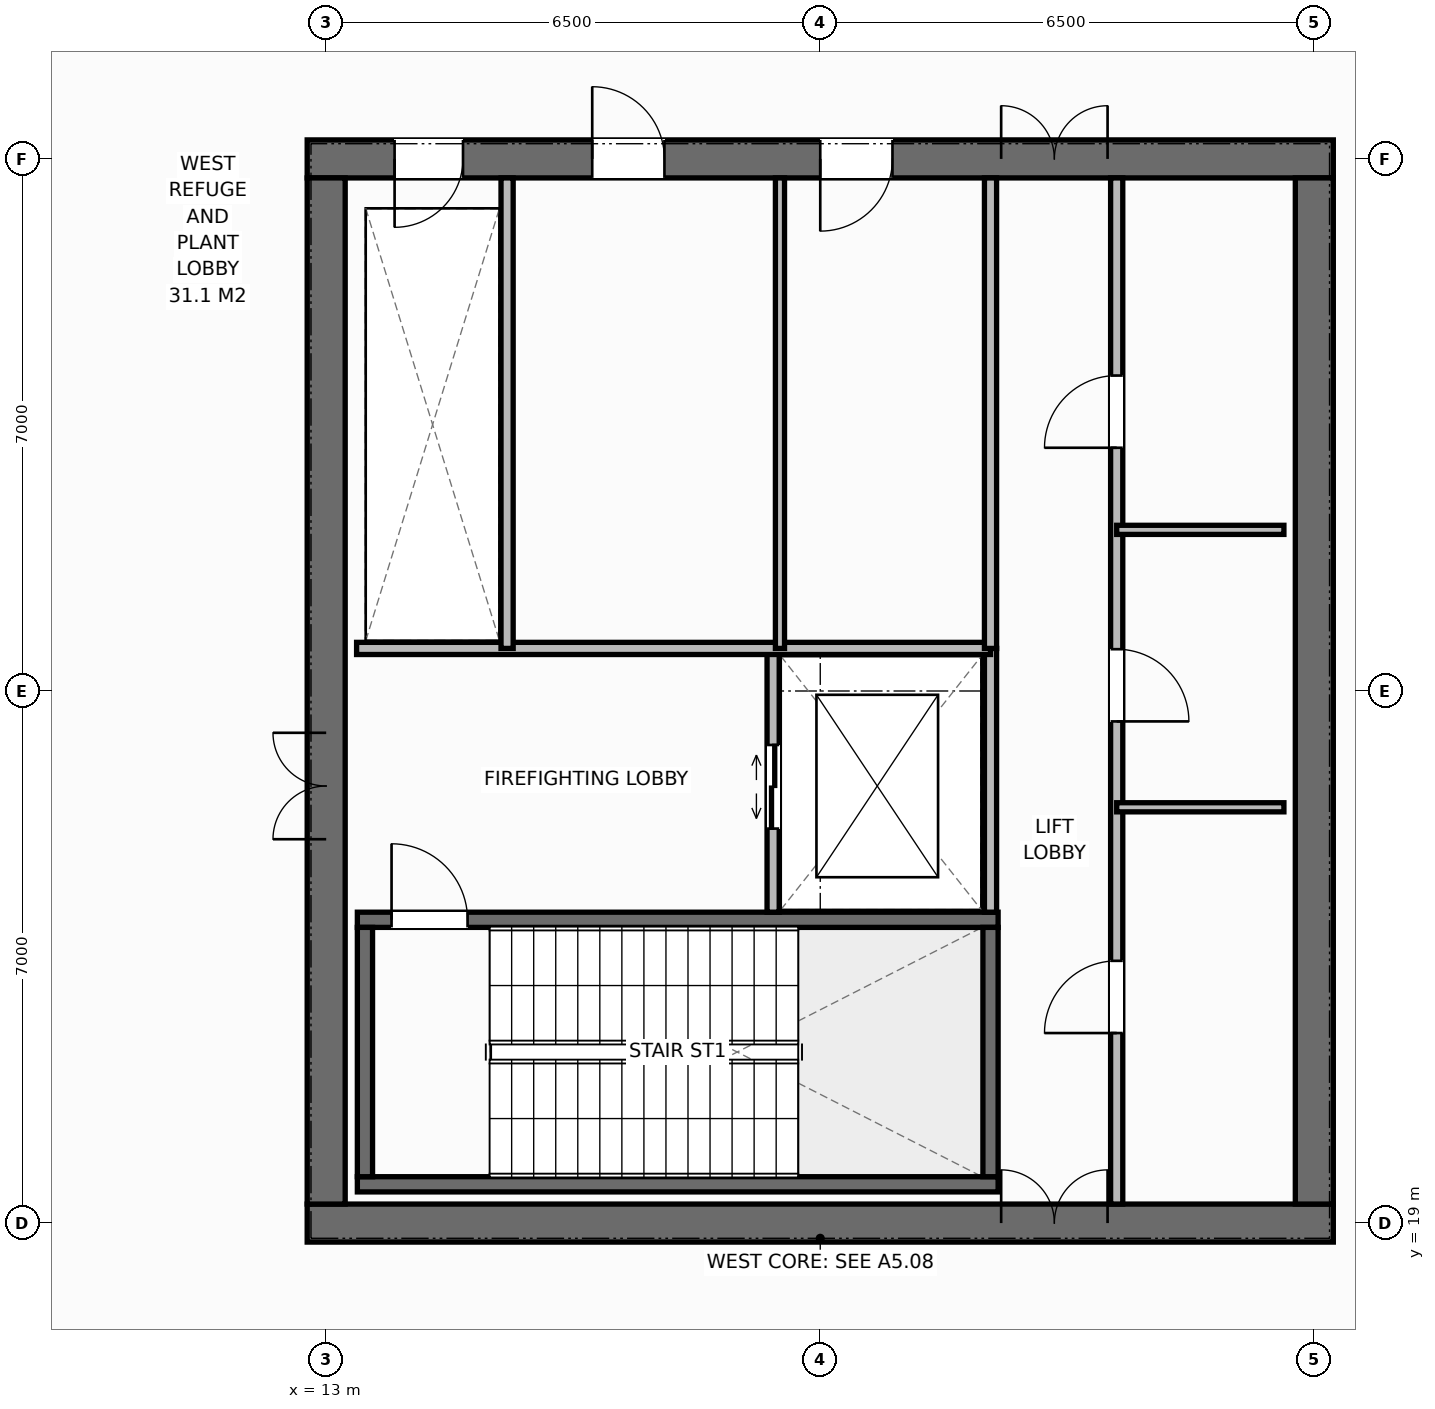
"""IFC4 building model, lengths in metres.
Left out: names, types, materials, properties, quantities, classifications, styles, units other than length and angle.
Written with IfcOpenShell. Run it as: python <this file> out.ifc"""

import sys

from ifc_helpers import new_model, si_unit, direction, frame, frame_2d, origin, place, context, subcontext, project, spatial, rectangle, extrude, element, fill, save


model = new_model("IFC4")
c1 = context("Model", 3, precision=1e-05, world=origin(), true_north=direction((0.0, 1.0)))
c2 = subcontext(c1, "Body", "Model", "MODEL_VIEW")
j1 = project(units=[si_unit("LENGTHUNIT", "METRE"), si_unit("PLANEANGLEUNIT", "RADIAN")], contexts=[c1])
p1 = place(None, origin())
s1 = spatial("IfcSite", under=j1, at=p1, CompositionType="ELEMENT")
p2 = place(p1, origin())
s2 = spatial("IfcBuilding", under=s1, at=p2, CompositionType="ELEMENT")
p3 = place(p2, frame((0.0, 0.0, 310.4)))
s3 = spatial("IfcBuildingStorey", under=s2, at=p3, CompositionType="ELEMENT", Elevation=310.4)
p4 = place(p3, frame((12.75, 19.0, 0.0), z_axis=(0.0, 0.0, 1.0), x_axis=(1.0, 0.0, 0.0)))
e1 = element("IfcWall", 1, at=p4, inside=s3, PredefinedType="SHEAR", context=c2, shape_type="SweptSolid", body=[
    extrude(rectangle(XDim=13.5, YDim=0.5, at=frame_2d((6.75, 0.0))), origin(), (0.0, 0.0, 1.0), 5.0),
])
p5 = place(p4, frame((9.13, 0.0, 0.0)))
e2 = element("IfcOpeningElement", 2, at=p5, cuts=e1, PredefinedType="OPENING", context=c2, shape_type="SweptSolid", body=[
    extrude(rectangle(XDim=1.4, YDim=2.2, at=frame_2d((0.7, 1.1))), frame((0.0, 0.26, 0.0), z_axis=(0.0, -1.0, 0.0), x_axis=(1.0, 0.0, 0.0)), (0.0, 0.0, 1.0), 0.52),
])
p6 = place(p3, frame((12.75, 33.0, 0.0), z_axis=(0.0, 0.0, 1.0), x_axis=(1.0, 0.0, 0.0)))
e3 = element("IfcWall", 3, at=p6, inside=s3, PredefinedType="SHEAR", context=c2, shape_type="SweptSolid", body=[
    extrude(rectangle(XDim=13.5, YDim=0.5, at=frame_2d((6.75, 0.0))), origin(), (0.0, 0.0, 1.0), 5.0),
])
p7 = place(p6, frame((1.15, 0.0, 0.0)))
e4 = element("IfcOpeningElement", 4, at=p7, cuts=e3, PredefinedType="OPENING", context=c2, shape_type="SweptSolid", body=[
    extrude(rectangle(XDim=0.9, YDim=2.15, at=frame_2d((0.45, 1.075))), frame((0.0, 0.26, 0.0), z_axis=(0.0, -1.0, 0.0), x_axis=(1.0, 0.0, 0.0)), (0.0, 0.0, 1.0), 0.52),
])
p8 = place(p6, frame((3.75, 0.0, 0.0)))
e5 = element("IfcOpeningElement", 5, at=p8, cuts=e3, PredefinedType="OPENING", context=c2, shape_type="SweptSolid", body=[
    extrude(rectangle(XDim=0.95, YDim=2.15, at=frame_2d((0.475, 1.075))), frame((0.0, 0.26, 0.0), z_axis=(0.0, -1.0, 0.0), x_axis=(1.0, 0.0, 0.0)), (0.0, 0.0, 1.0), 0.52),
])
p9 = place(p6, frame((6.75, 0.0, 0.0)))
e6 = element("IfcOpeningElement", 6, at=p9, cuts=e3, PredefinedType="OPENING", context=c2, shape_type="SweptSolid", body=[
    extrude(rectangle(XDim=0.95, YDim=2.15, at=frame_2d((0.475, 1.075))), frame((0.0, 0.26, 0.0), z_axis=(0.0, -1.0, 0.0), x_axis=(1.0, 0.0, 0.0)), (0.0, 0.0, 1.0), 0.52),
])
p10 = place(p6, frame((9.13, 0.0, 0.0)))
e7 = element("IfcOpeningElement", 7, at=p10, cuts=e3, PredefinedType="OPENING", context=c2, shape_type="SweptSolid", body=[
    extrude(rectangle(XDim=1.4, YDim=2.2, at=frame_2d((0.7, 1.1))), frame((0.0, 0.26, 0.0), z_axis=(0.0, -1.0, 0.0), x_axis=(1.0, 0.0, 0.0)), (0.0, 0.0, 1.0), 0.52),
])
p11 = place(p3, frame((13.0, 19.25, 0.0), z_axis=(0.0, 0.0, 1.0), x_axis=(0.0, 1.0, 0.0)))
e8 = element("IfcWall", 8, at=p11, inside=s3, PredefinedType="SHEAR", context=c2, shape_type="SweptSolid", body=[
    extrude(rectangle(XDim=13.5, YDim=0.5, at=frame_2d((6.75, 0.0))), origin(), (0.0, 0.0, 1.0), 5.0),
])
p12 = place(p11, frame((4.8, 0.0, 0.0)))
e9 = element("IfcOpeningElement", 9, at=p12, cuts=e8, PredefinedType="OPENING", context=c2, shape_type="SweptSolid", body=[
    extrude(rectangle(XDim=1.4, YDim=2.2, at=frame_2d((0.7, 1.1))), frame((0.0, 0.26, 0.0), z_axis=(0.0, -1.0, 0.0), x_axis=(1.0, 0.0, 0.0)), (0.0, 0.0, 1.0), 0.52),
])
p13 = place(p3, frame((26.0, 19.25, 0.0), z_axis=(0.0, 0.0, 1.0), x_axis=(0.0, 1.0, 0.0)))
e10 = element("IfcWall", 10, at=p13, inside=s3, PredefinedType="SHEAR", context=c2, shape_type="SweptSolid", body=[
    extrude(rectangle(XDim=13.5, YDim=0.5, at=frame_2d((6.75, 0.0))), origin(), (0.0, 0.0, 1.0), 5.0),
])
p14 = place(p3, frame((13.41, 19.51, 0.0), z_axis=(0.0, 0.0, 1.0), x_axis=(1.0, 0.0, 0.0)))
e11 = element("IfcWall", 11, at=p14, inside=s3, PredefinedType="SHEAR", context=c2, shape_type="SweptSolid", body=[
    extrude(rectangle(XDim=8.43, YDim=0.2, at=frame_2d((4.215, 0.0))), origin(), (0.0, 0.0, 1.0), 5.0),
])
p15 = place(p3, frame((13.41, 22.99, 0.0), z_axis=(0.0, 0.0, 1.0), x_axis=(1.0, 0.0, 0.0)))
e12 = element("IfcWall", 12, at=p15, inside=s3, PredefinedType="SHEAR", context=c2, shape_type="SweptSolid", body=[
    extrude(rectangle(XDim=8.43, YDim=0.2, at=frame_2d((4.215, 0.0))), origin(), (0.0, 0.0, 1.0), 5.0),
])
p16 = place(p15, frame((0.45, 0.0, 0.0)))
e13 = element("IfcOpeningElement", 13, at=p16, cuts=e12, PredefinedType="OPENING", context=c2, shape_type="SweptSolid", body=[
    extrude(rectangle(XDim=1.0, YDim=2.15, at=frame_2d((0.5, 1.075))), frame((0.0, 0.11, 0.0), z_axis=(0.0, -1.0, 0.0), x_axis=(1.0, 0.0, 0.0)), (0.0, 0.0, 1.0), 0.22),
])
for number, where, z_axis, x_axis in (
    (14, (13.51, 19.61, 0.0), (0.0, 0.0, 1.0), (0.0, 1.0, 0.0)),
    (15, (21.74, 19.61, 0.0), (0.0, 0.0, 1.0), (0.0, 1.0, 0.0)),
):
    element("IfcWall", number, at=place(p3, frame(where, z_axis=z_axis, x_axis=x_axis)), inside=s3, PredefinedType="SHEAR", context=c2, shape_type="SweptSolid", body=[
        extrude(rectangle(XDim=3.28, YDim=0.2, at=frame_2d((1.64, 0.0))), origin(), (0.0, 0.0, 1.0), 5.0),
    ])
p17 = place(p3, frame((21.74, 23.09, 0.0), z_axis=(0.0, 0.0, 1.0), x_axis=(0.0, 1.0, 0.0)))
e16 = element("IfcWall", 16, at=p17, inside=s3, PredefinedType="STANDARD", context=c2, shape_type="SweptSolid", body=[
    extrude(rectangle(XDim=3.47, YDim=0.16, at=frame_2d((1.735, 0.0))), origin(), (0.0, 0.0, 1.0), 4.72),
])
p18 = place(p3, frame((18.88, 23.09, 0.0), z_axis=(0.0, 0.0, 1.0), x_axis=(0.0, 1.0, 0.0)))
e17 = element("IfcWall", 17, at=p18, inside=s3, PredefinedType="STANDARD", context=c2, shape_type="SweptSolid", body=[
    extrude(rectangle(XDim=3.47, YDim=0.16, at=frame_2d((1.735, 0.0))), origin(), (0.0, 0.0, 1.0), 4.72),
])
p19 = place(p18, frame((1.1, 0.0, 0.0)))
e18 = element("IfcOpeningElement", 18, at=p19, cuts=e17, PredefinedType="OPENING", context=c2, shape_type="SweptSolid", body=[
    extrude(rectangle(XDim=1.1, YDim=2.2, at=frame_2d((0.55, 1.1))), frame((0.0, 0.09, 0.0), z_axis=(0.0, -1.0, 0.0), x_axis=(1.0, 0.0, 0.0)), (0.0, 0.0, 1.0), 0.18),
])
p20 = place(p3, frame((13.4, 26.56, 0.0), z_axis=(0.0, 0.0, 1.0), x_axis=(1.0, 0.0, 0.0)))
e19 = element("IfcWall", 19, at=p20, inside=s3, PredefinedType="STANDARD", context=c2, shape_type="SweptSolid", body=[
    extrude(rectangle(XDim=8.34, YDim=0.16, at=frame_2d((4.17, 0.0))), origin(), (0.0, 0.0, 1.0), 4.72),
])
p21 = place(p3, frame((15.38, 26.56, 0.0), z_axis=(0.0, 0.0, 1.0), x_axis=(0.0, 1.0, 0.0)))
e20 = element("IfcWall", 20, at=p21, inside=s3, PredefinedType="STANDARD", context=c2, shape_type="SweptSolid", body=[
    extrude(rectangle(XDim=6.19, YDim=0.16, at=frame_2d((3.095, 0.0))), origin(), (0.0, 0.0, 1.0), 4.72),
])
p22 = place(p3, frame((18.97, 26.56, 0.0), z_axis=(0.0, 0.0, 1.0), x_axis=(0.0, 1.0, 0.0)))
e21 = element("IfcWall", 21, at=p22, inside=s3, PredefinedType="PARTITIONING", context=c2, shape_type="SweptSolid", body=[
    extrude(rectangle(XDim=6.19, YDim=0.12, at=frame_2d((3.095, 0.0))), origin(), (0.0, 0.0, 1.0), 4.72),
])
p23 = place(p3, frame((21.74, 26.56, 0.0), z_axis=(0.0, 0.0, 1.0), x_axis=(0.0, 1.0, 0.0)))
e22 = element("IfcWall", 22, at=p23, inside=s3, PredefinedType="STANDARD", context=c2, shape_type="SweptSolid", body=[
    extrude(rectangle(XDim=6.19, YDim=0.16, at=frame_2d((3.095, 0.0))), origin(), (0.0, 0.0, 1.0), 4.72),
])
p24 = place(p3, frame((23.4, 19.25, 0.0), z_axis=(0.0, 0.0, 1.0), x_axis=(0.0, 1.0, 0.0)))
e23 = element("IfcWall", 23, at=p24, inside=s3, PredefinedType="STANDARD", context=c2, shape_type="SweptSolid", body=[
    extrude(rectangle(XDim=13.5, YDim=0.16, at=frame_2d((6.75, 0.0))), origin(), (0.0, 0.0, 1.0), 4.72),
])
p25 = place(p24, frame((2.25, 0.0, 0.0)))
e24 = element("IfcOpeningElement", 24, at=p25, cuts=e23, PredefinedType="OPENING", context=c2, shape_type="SweptSolid", body=[
    extrude(rectangle(XDim=0.95, YDim=2.15, at=frame_2d((0.475, 1.075))), frame((0.0, 0.09, 0.0), z_axis=(0.0, -1.0, 0.0), x_axis=(1.0, 0.0, 0.0)), (0.0, 0.0, 1.0), 0.18),
])
p26 = place(p24, frame((6.35, 0.0, 0.0)))
e25 = element("IfcOpeningElement", 25, at=p26, cuts=e23, PredefinedType="OPENING", context=c2, shape_type="SweptSolid", body=[
    extrude(rectangle(XDim=0.95, YDim=2.15, at=frame_2d((0.475, 1.075))), frame((0.0, 0.09, 0.0), z_axis=(0.0, -1.0, 0.0), x_axis=(1.0, 0.0, 0.0)), (0.0, 0.0, 1.0), 0.18),
])
p27 = place(p24, frame((9.95, 0.0, 0.0)))
e26 = element("IfcOpeningElement", 26, at=p27, cuts=e23, PredefinedType="OPENING", context=c2, shape_type="SweptSolid", body=[
    extrude(rectangle(XDim=0.95, YDim=2.15, at=frame_2d((0.475, 1.075))), frame((0.0, 0.09, 0.0), z_axis=(0.0, -1.0, 0.0), x_axis=(1.0, 0.0, 0.0)), (0.0, 0.0, 1.0), 0.18),
])
for number, where, z_axis, x_axis in (
    (27, (23.4, 24.47, 0.0), (0.0, 0.0, 1.0), (1.0, 0.0, 0.0)),
    (28, (23.4, 28.12, 0.0), (0.0, 0.0, 1.0), (1.0, 0.0, 0.0)),
):
    element("IfcWall", number, at=place(p3, frame(where, z_axis=z_axis, x_axis=x_axis)), inside=s3, PredefinedType="PARTITIONING", context=c2, shape_type="SweptSolid", body=[
        extrude(rectangle(XDim=2.2, YDim=0.12, at=frame_2d((1.1, 0.0))), origin(), (0.0, 0.0, 1.0), 4.72),
    ])
p28 = place(p16, origin())
e29 = element("IfcDoor", 29, at=p28, inside=s3, OperationType="SINGLE_SWING_LEFT", PredefinedType="DOOR", context=c2, shape_type="SweptSolid", body=[
    extrude(rectangle(XDim=1.0, YDim=2.15, at=frame_2d((0.5, 1.075))), frame((0.0, 0.025, 0.0), z_axis=(0.0, -1.0, 0.0), x_axis=(1.0, 0.0, 0.0)), (0.0, 0.0, 1.0), 0.05),
])
fill(e13, e29)
p29 = place(p12, origin())
e30 = element("IfcDoor", 30, at=p29, inside=s3, OperationType="DOUBLE_DOOR_SINGLE_SWING", PredefinedType="DOOR", context=c2, shape_type="SweptSolid", body=[
    extrude(rectangle(XDim=1.4, YDim=2.2, at=frame_2d((0.7, 1.1))), frame((0.0, 0.025, 0.0), z_axis=(0.0, -1.0, 0.0), x_axis=(1.0, 0.0, 0.0)), (0.0, 0.0, 1.0), 0.05),
])
fill(e9, e30)
p30 = place(p19, origin())
e31 = element("IfcDoor", 31, at=p30, inside=s3, OperationType="DOUBLE_DOOR_SLIDING", PredefinedType="DOOR", context=c2, shape_type="SweptSolid", body=[
    extrude(rectangle(XDim=1.1, YDim=2.2, at=frame_2d((0.55, 1.1))), frame((0.0, 0.025, 0.0), z_axis=(0.0, -1.0, 0.0), x_axis=(1.0, 0.0, 0.0)), (0.0, 0.0, 1.0), 0.05),
])
fill(e18, e31)
p31 = place(p7, origin())
e32 = element("IfcDoor", 32, at=p31, inside=s3, OperationType="SINGLE_SWING_RIGHT", PredefinedType="DOOR", context=c2, shape_type="SweptSolid", body=[
    extrude(rectangle(XDim=0.9, YDim=2.15, at=frame_2d((0.45, 1.075))), frame((0.0, -0.025, 0.0), z_axis=(0.0, -1.0, 0.0), x_axis=(1.0, 0.0, 0.0)), (0.0, 0.0, 1.0), 0.05),
])
fill(e4, e32)
p32 = place(p8, origin())
e33 = element("IfcDoor", 33, at=p32, inside=s3, OperationType="SINGLE_SWING_LEFT", PredefinedType="DOOR", context=c2, shape_type="SweptSolid", body=[
    extrude(rectangle(XDim=0.95, YDim=2.15, at=frame_2d((0.475, 1.075))), frame((0.0, -0.025, 0.0), z_axis=(0.0, -1.0, 0.0), x_axis=(1.0, 0.0, 0.0)), (0.0, 0.0, 1.0), 0.05),
])
fill(e5, e33)
p33 = place(p9, origin())
e34 = element("IfcDoor", 34, at=p33, inside=s3, OperationType="SINGLE_SWING_RIGHT", PredefinedType="DOOR", context=c2, shape_type="SweptSolid", body=[
    extrude(rectangle(XDim=0.95, YDim=2.15, at=frame_2d((0.475, 1.075))), frame((0.0, -0.025, 0.0), z_axis=(0.0, -1.0, 0.0), x_axis=(1.0, 0.0, 0.0)), (0.0, 0.0, 1.0), 0.05),
])
fill(e6, e34)
p34 = place(p5, origin())
e35 = element("IfcDoor", 35, at=p34, inside=s3, OperationType="DOUBLE_DOOR_SINGLE_SWING", PredefinedType="DOOR", context=c2, shape_type="SweptSolid", body=[
    extrude(rectangle(XDim=1.4, YDim=2.2, at=frame_2d((0.7, 1.1))), frame((0.0, 0.075, 0.0), z_axis=(0.0, -1.0, 0.0), x_axis=(1.0, 0.0, 0.0)), (0.0, 0.0, 1.0), 0.05),
])
fill(e2, e35)
p35 = place(p10, origin())
e36 = element("IfcDoor", 36, at=p35, inside=s3, OperationType="DOUBLE_DOOR_SINGLE_SWING", PredefinedType="DOOR", context=c2, shape_type="SweptSolid", body=[
    extrude(rectangle(XDim=1.4, YDim=2.2, at=frame_2d((0.7, 1.1))), frame((0.0, -0.025, 0.0), z_axis=(0.0, -1.0, 0.0), x_axis=(1.0, 0.0, 0.0)), (0.0, 0.0, 1.0), 0.05),
])
fill(e7, e36)
p36 = place(p25, origin())
e37 = element("IfcDoor", 37, at=p36, inside=s3, OperationType="SINGLE_SWING_LEFT", PredefinedType="DOOR", context=c2, shape_type="SweptSolid", body=[
    extrude(rectangle(XDim=0.95, YDim=2.15, at=frame_2d((0.475, 1.075))), frame((0.0, 0.025, 0.0), z_axis=(0.0, -1.0, 0.0), x_axis=(1.0, 0.0, 0.0)), (0.0, 0.0, 1.0), 0.05),
])
fill(e24, e37)
p37 = place(p26, origin())
e38 = element("IfcDoor", 38, at=p37, inside=s3, OperationType="SINGLE_SWING_RIGHT", PredefinedType="DOOR", context=c2, shape_type="SweptSolid", body=[
    extrude(rectangle(XDim=0.95, YDim=2.15, at=frame_2d((0.475, 1.075))), frame((0.0, 0.025, 0.0), z_axis=(0.0, -1.0, 0.0), x_axis=(1.0, 0.0, 0.0)), (0.0, 0.0, 1.0), 0.05),
])
fill(e25, e38)
p38 = place(p27, origin())
e39 = element("IfcDoor", 39, at=p38, inside=s3, OperationType="SINGLE_SWING_LEFT", PredefinedType="DOOR", context=c2, shape_type="SweptSolid", body=[
    extrude(rectangle(XDim=0.95, YDim=2.15, at=frame_2d((0.475, 1.075))), frame((0.0, 0.025, 0.0), z_axis=(0.0, -1.0, 0.0), x_axis=(1.0, 0.0, 0.0)), (0.0, 0.0, 1.0), 0.05),
])
fill(e26, e39)
save(model, sys.argv[1])
